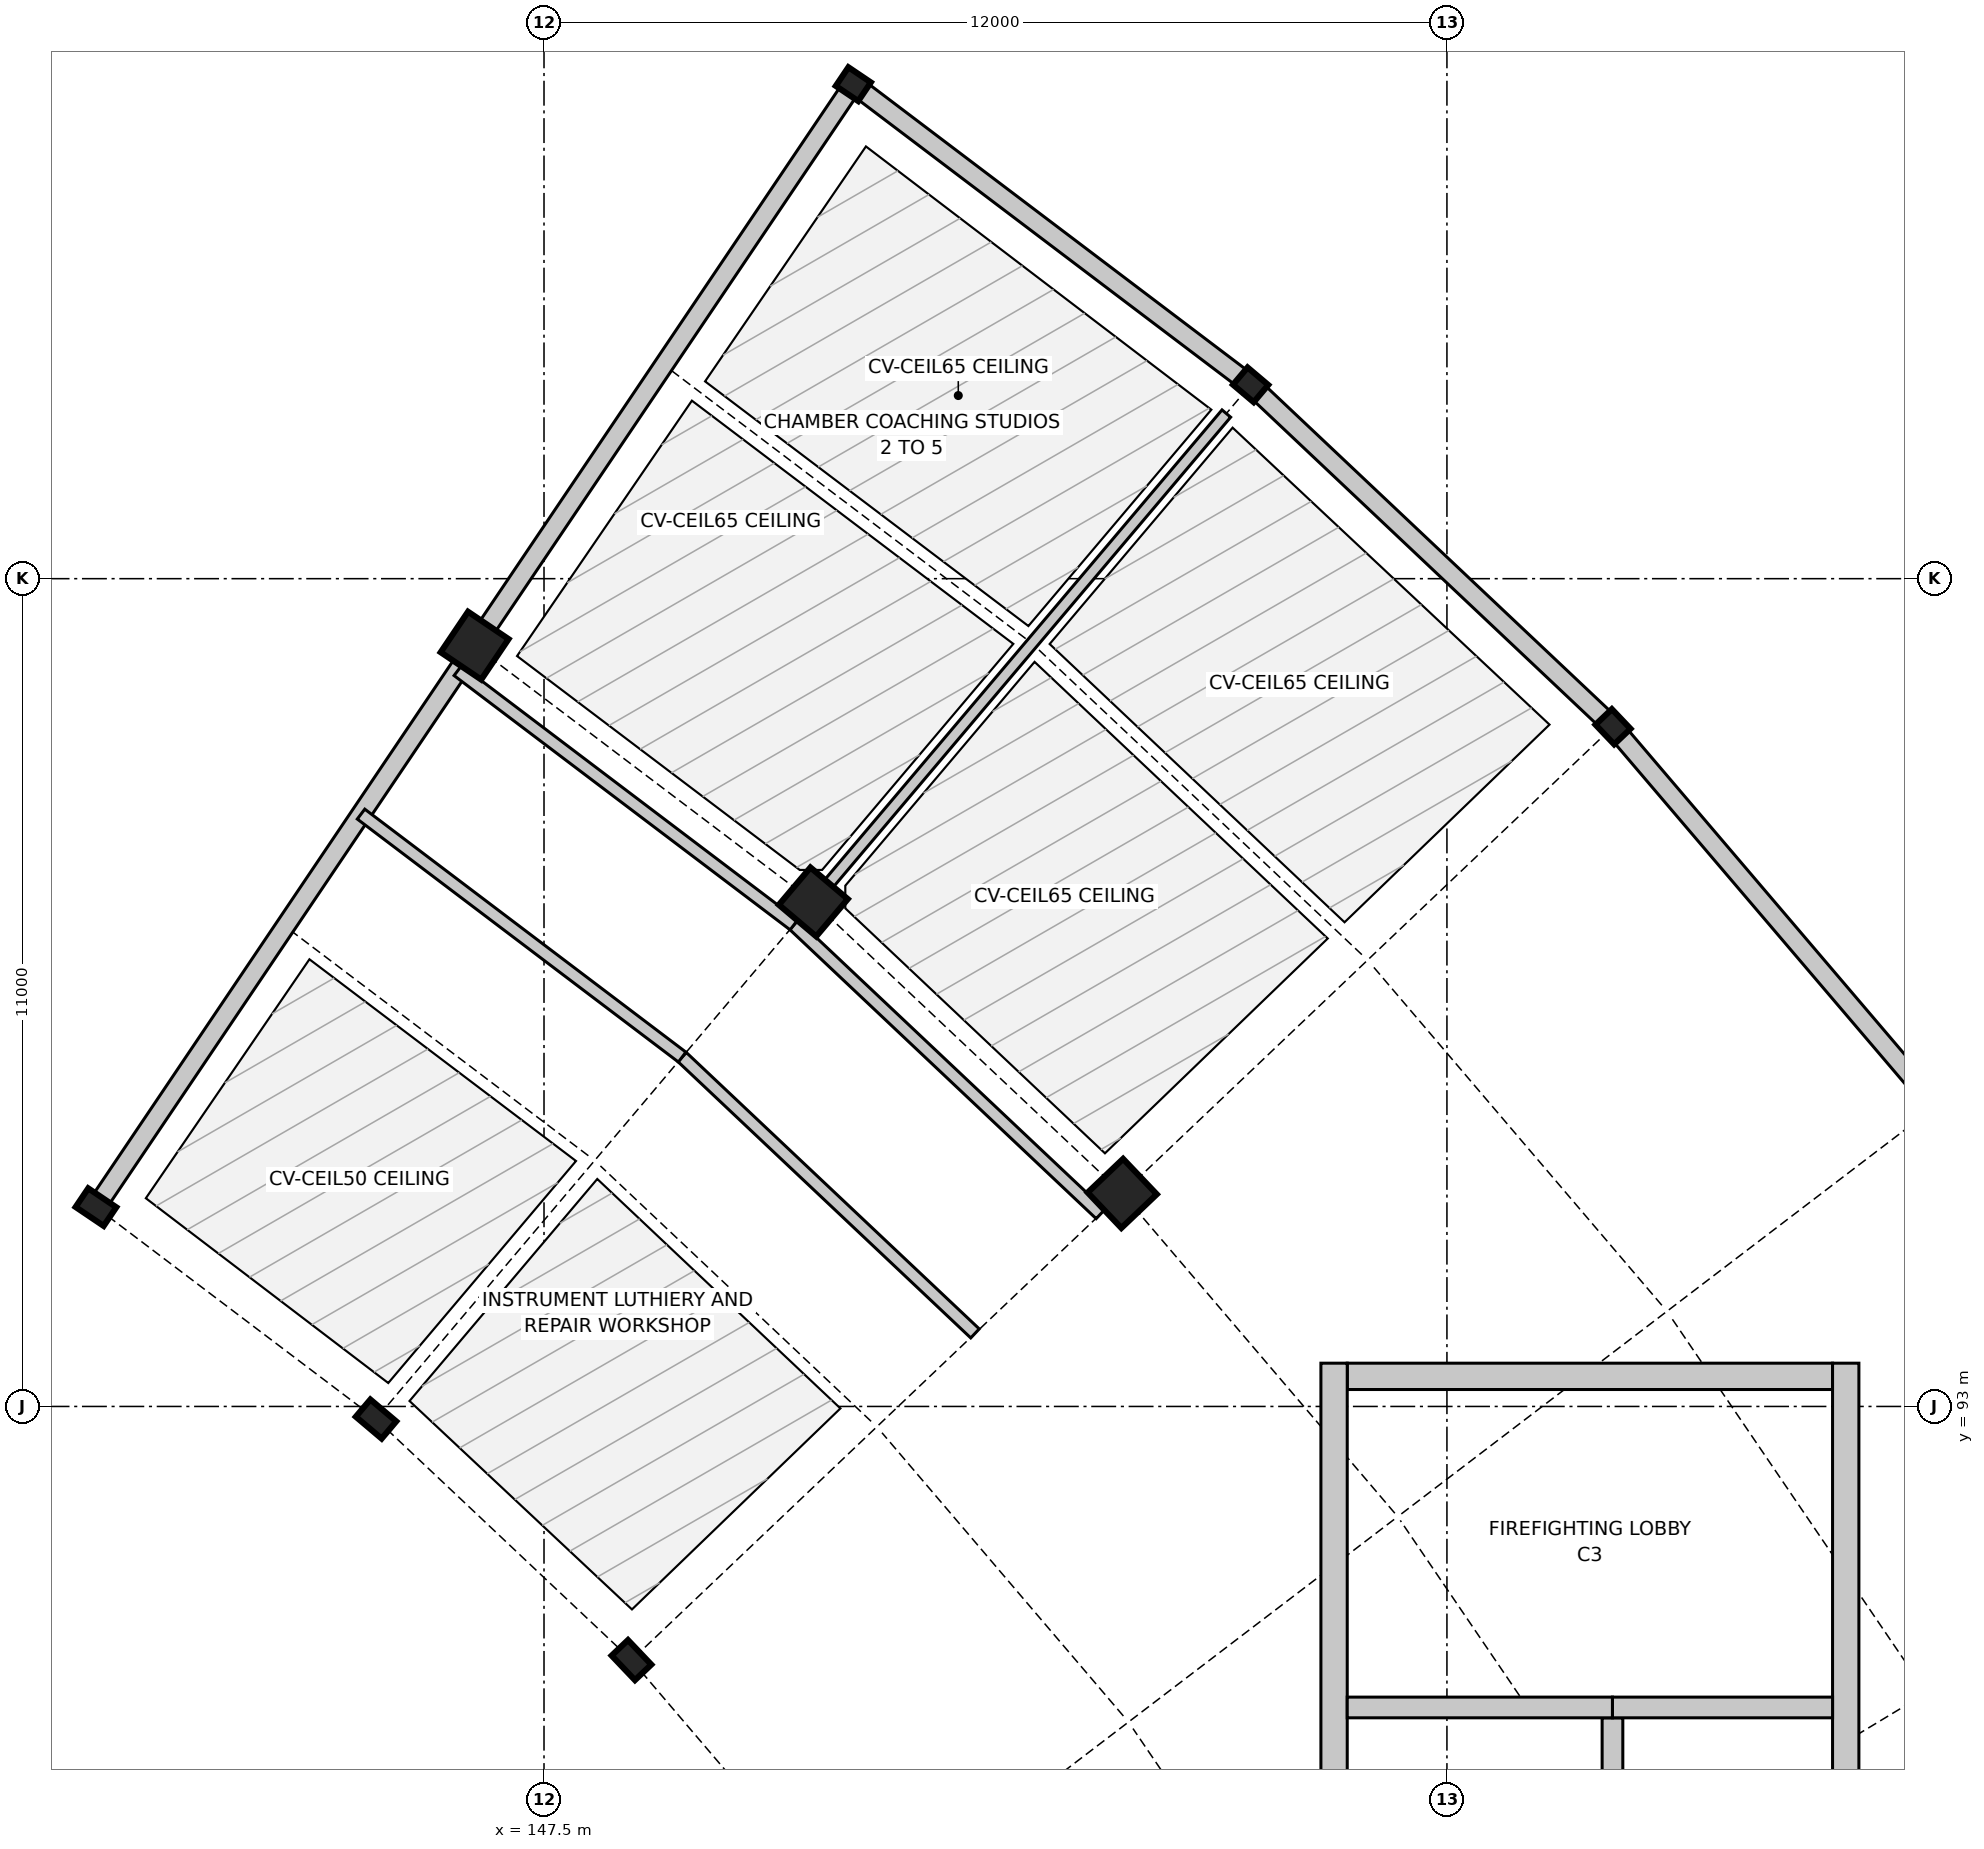
"""IFC4 building model, lengths in metres.
Left out: names, types, materials, properties, quantities, classifications, styles, units other than length and angle.
Written with IfcOpenShell. Run it as: python <this file> out.ifc"""

import sys

from ifc_helpers import new_model, si_unit, direction, frame, frame_2d, origin, origin_2d, place, context, subcontext, project, spatial, rectangle, i_section, extrude, element, fill, save


model = new_model("IFC4")
c1 = context("Model", 3, precision=1e-05, world=origin(), true_north=direction((0.0, 1.0)))
c2 = subcontext(c1, "Body", "Model", "MODEL_VIEW")
j1 = project(units=[si_unit("LENGTHUNIT", "METRE"), si_unit("PLANEANGLEUNIT", "RADIAN")], contexts=[c1])
p1 = place(None, origin())
s1 = spatial("IfcSite", under=j1, at=p1, CompositionType="ELEMENT")
p2 = place(p1, origin())
s2 = spatial("IfcBuilding", under=s1, at=p2, CompositionType="ELEMENT")
p3 = place(p2, frame((0.0, 0.0, 14.4)))
s3 = spatial("IfcBuildingStorey", under=s2, at=p3, CompositionType="ELEMENT", Elevation=14.4)
p4 = place(p3, frame((148.662, 89.629, 0.0), z_axis=(0.0, 0.0, 1.0), x_axis=(0.724653130187, 0.689113808387, 0.0)))
e1 = element("IfcColumn", 1, at=p4, inside=s3, PredefinedType="COLUMN", context=c2, shape_type="SweptSolid", body=[
    extrude(i_section(OverallWidth=0.3, OverallDepth=0.45, WebThickness=0.014, FlangeThickness=0.026, FilletRadius=0.027, at=origin_2d()), origin(), (0.0, 0.0, 1.0), 4.2),
])
p5 = place(p3, frame((155.185, 95.831, 0.0), z_axis=(0.0, 0.0, 1.0), x_axis=(0.724653130187, 0.689113808387, 0.0)))
e2 = element("IfcColumn", 2, at=p5, inside=s3, PredefinedType="COLUMN", context=c2, shape_type="SweptSolid", body=[
    extrude(rectangle(XDim=0.65, YDim=0.65, at=origin_2d()), origin(), (0.0, 0.0, 1.0), 4.2),
])
p6 = place(p3, frame((161.707, 102.032, 0.0), z_axis=(0.0, 0.0, 1.0), x_axis=(0.724653130187, 0.689113808387, 0.0)))
e3 = element("IfcColumn", 3, at=p6, inside=s3, PredefinedType="COLUMN", context=c2, shape_type="SweptSolid", body=[
    extrude(i_section(OverallWidth=0.3, OverallDepth=0.36, WebThickness=0.012, FlangeThickness=0.022, FilletRadius=0.027, at=origin_2d()), origin(), (0.0, 0.0, 1.0), 4.2),
])
p7 = place(p3, frame((145.267, 92.833, 0.0), z_axis=(0.0, 0.0, 1.0), x_axis=(0.645724263505, 0.763570674869, 0.0)))
e4 = element("IfcColumn", 4, at=p7, inside=s3, PredefinedType="COLUMN", context=c2, shape_type="SweptSolid", body=[
    extrude(i_section(OverallWidth=0.3, OverallDepth=0.45, WebThickness=0.014, FlangeThickness=0.026, FilletRadius=0.027, at=origin_2d()), origin(), (0.0, 0.0, 1.0), 4.2),
])
p8 = place(p3, frame((151.079, 99.704, 0.0), z_axis=(0.0, 0.0, 1.0), x_axis=(0.645724263505, 0.763570674869, 0.0)))
e5 = element("IfcColumn", 5, at=p8, inside=s3, PredefinedType="COLUMN", context=c2, shape_type="SweptSolid", body=[
    extrude(rectangle(XDim=0.65, YDim=0.65, at=origin_2d()), origin(), (0.0, 0.0, 1.0), 4.2),
])
p9 = place(p3, frame((156.891, 106.576, 0.0), z_axis=(0.0, 0.0, 1.0), x_axis=(0.645724263505, 0.763570674869, 0.0)))
e6 = element("IfcColumn", 6, at=p9, inside=s3, PredefinedType="COLUMN", context=c2, shape_type="SweptSolid", body=[
    extrude(i_section(OverallWidth=0.3, OverallDepth=0.36, WebThickness=0.012, FlangeThickness=0.022, FilletRadius=0.027, at=origin_2d()), origin(), (0.0, 0.0, 1.0), 4.2),
])
p10 = place(p3, frame((141.545, 95.649, 0.0), z_axis=(0.0, 0.0, 1.0), x_axis=(0.559192903471, 0.829037572555, 0.0)))
e7 = element("IfcColumn", 7, at=p10, inside=s3, PredefinedType="COLUMN", context=c2, shape_type="SweptSolid", body=[
    extrude(i_section(OverallWidth=0.3, OverallDepth=0.45, WebThickness=0.014, FlangeThickness=0.026, FilletRadius=0.027, at=origin_2d()), origin(), (0.0, 0.0, 1.0), 4.2),
])
p11 = place(p3, frame((146.578, 103.11, 0.0), z_axis=(0.0, 0.0, 1.0), x_axis=(0.559192903471, 0.829037572555, 0.0)))
e8 = element("IfcColumn", 8, at=p11, inside=s3, PredefinedType="COLUMN", context=c2, shape_type="SweptSolid", body=[
    extrude(rectangle(XDim=0.65, YDim=0.65, at=origin_2d()), origin(), (0.0, 0.0, 1.0), 4.2),
])
p12 = place(p3, frame((151.611, 110.571, 0.0), z_axis=(0.0, 0.0, 1.0), x_axis=(0.559192903471, 0.829037572555, 0.0)))
e9 = element("IfcColumn", 9, at=p12, inside=s3, PredefinedType="COLUMN", context=c2, shape_type="SweptSolid", body=[
    extrude(i_section(OverallWidth=0.3, OverallDepth=0.36, WebThickness=0.012, FlangeThickness=0.022, FilletRadius=0.027, at=origin_2d()), origin(), (0.0, 0.0, 1.0), 4.2),
])
p13 = place(p3, frame((161.72, 102.017, 0.0), z_axis=(0.0, 0.0, 1.0), x_axis=(0.648708464949, -0.761037007973, 0.0)))
e10 = element("IfcWall", 10, at=p13, inside=s3, PredefinedType="SOLIDWALL", context=c2, shape_type="SweptSolid", body=[
    extrude(rectangle(XDim=6.581, YDim=0.25, at=frame_2d((3.291, 0.0))), origin(), (0.0, 0.0, 1.0), 3.398),
])
p14 = place(p13, frame((2.615, 0.0, 0.9)))
e11 = element("IfcOpeningElement", 11, at=p14, cuts=e10, PredefinedType="OPENING", context=c2, shape_type="SweptSolid", body=[
    extrude(rectangle(XDim=1.35, YDim=1.55, at=frame_2d((0.675, 0.775))), frame((0.0, 0.135, 0.0), z_axis=(0.0, -1.0, 0.0), x_axis=(1.0, 0.0, 0.0)), (0.0, 0.0, 1.0), 0.27),
])
p15 = place(p3, frame((156.906, 106.562, 0.0), z_axis=(0.0, 0.0, 1.0), x_axis=(0.727377231984, -0.686237832235, 0.0)))
e12 = element("IfcWall", 12, at=p15, inside=s3, PredefinedType="SOLIDWALL", context=c2, shape_type="SweptSolid", body=[
    extrude(rectangle(XDim=6.581, YDim=0.25, at=frame_2d((3.291, 0.0))), origin(), (0.0, 0.0, 1.0), 3.398),
])
p16 = place(p15, frame((2.541, 0.0, 0.9)))
e13 = element("IfcOpeningElement", 13, at=p16, cuts=e12, PredefinedType="OPENING", context=c2, shape_type="SweptSolid", body=[
    extrude(rectangle(XDim=1.5, YDim=1.55, at=frame_2d((0.75, 0.775))), frame((0.0, 0.135, 0.0), z_axis=(0.0, -1.0, 0.0), x_axis=(1.0, 0.0, 0.0)), (0.0, 0.0, 1.0), 0.27),
])
p17 = place(p3, frame((151.627, 110.559, 0.0), z_axis=(0.0, 0.0, 1.0), x_axis=(0.797477783019, -0.603348311998, 0.0)))
e14 = element("IfcWall", 14, at=p17, inside=s3, PredefinedType="SOLIDWALL", context=c2, shape_type="SweptSolid", body=[
    extrude(rectangle(XDim=6.581, YDim=0.25, at=frame_2d((3.291, 0.0))), origin(), (0.0, 0.0, 1.0), 3.398),
])
p18 = place(p17, frame((2.466, 0.0, 0.9)))
e15 = element("IfcOpeningElement", 15, at=p18, cuts=e14, PredefinedType="OPENING", context=c2, shape_type="SweptSolid", body=[
    extrude(rectangle(XDim=1.65, YDim=1.55, at=frame_2d((0.825, 0.775))), frame((0.0, 0.135, 0.0), z_axis=(0.0, -1.0, 0.0), x_axis=(1.0, 0.0, 0.0)), (0.0, 0.0, 1.0), 0.27),
])
p19 = place(p3, frame((141.556, 95.665, 0.0), z_axis=(0.0, 0.0, 1.0), x_axis=(0.559200466777, 0.829032470991, 0.0)))
e16 = element("IfcWall", 16, at=p19, inside=s3, PredefinedType="SOLIDWALL", context=c2, shape_type="SweptSolid", body=[
    extrude(rectangle(XDim=8.96, YDim=0.25, at=frame_2d((4.48, 0.0))), origin(), (0.0, 0.0, 1.0), 3.398),
])
p20 = place(p3, frame((146.589, 103.127, 0.0), z_axis=(0.0, 0.0, 1.0), x_axis=(0.559213098812, 0.829023950268, 0.0)))
e17 = element("IfcWall", 17, at=p20, inside=s3, PredefinedType="SOLIDWALL", context=c2, shape_type="SweptSolid", body=[
    extrude(rectangle(XDim=8.96, YDim=0.25, at=frame_2d((4.48, 0.0))), origin(), (0.0, 0.0, 1.0), 3.398),
])
p21 = place(p3, frame((158.175, 93.4, 0.0), z_axis=(0.0, 0.0, 1.0), x_axis=(1.0, 0.0, 0.0)))
e18 = element("IfcWall", 18, at=p21, inside=s3, PredefinedType="SHEAR", context=c2, shape_type="SweptSolid", body=[
    extrude(rectangle(XDim=6.45, YDim=0.35, at=frame_2d((3.225, 0.0))), origin(), (0.0, 0.0, 1.0), 3.96),
])
p22 = place(p21, frame((2.55, 0.0, 0.0)))
e19 = element("IfcOpeningElement", 19, at=p22, cuts=e18, PredefinedType="OPENING", context=c2, shape_type="SweptSolid", body=[
    extrude(rectangle(XDim=1.35, YDim=2.2, at=frame_2d((0.675, 1.1))), frame((0.0, 0.185, 0.0), z_axis=(0.0, -1.0, 0.0), x_axis=(1.0, 0.0, 0.0)), (0.0, 0.0, 1.0), 0.37),
])
for number, where, z_axis, x_axis in (
    (20, (158.0, 81.975, 0.0), (0.0, 0.0, 1.0), (0.0, 1.0, 0.0)),
    (21, (164.8, 81.975, 0.0), (0.0, 0.0, 1.0), (0.0, 1.0, 0.0)),
):
    element("IfcWall", number, at=place(p3, frame(where, z_axis=z_axis, x_axis=x_axis)), inside=s3, PredefinedType="SHEAR", context=c2, shape_type="SweptSolid", body=[
        extrude(rectangle(XDim=11.6, YDim=0.35, at=frame_2d((5.8, 0.0))), origin(), (0.0, 0.0, 1.0), 3.96),
    ])
p23 = place(p3, frame((161.7, 81.975, 0.0), z_axis=(0.0, 0.0, 1.0), x_axis=(0.0, 1.0, 0.0)))
e22 = element("IfcWall", 22, at=p23, inside=s3, PredefinedType="SHEAR", context=c2, shape_type="SweptSolid", body=[
    extrude(rectangle(XDim=6.887, YDim=0.275, at=frame_2d((3.444, 0.0))), origin(), (0.0, 0.0, 1.0), 3.96),
])
p24 = place(p3, frame((158.175, 89.0, 0.0), z_axis=(0.0, 0.0, 1.0), x_axis=(1.0, 0.0, 0.0)))
e23 = element("IfcWall", 23, at=p24, inside=s3, PredefinedType="SHEAR", context=c2, shape_type="SweptSolid", body=[
    extrude(rectangle(XDim=3.525, YDim=0.275, at=frame_2d((1.762, 0.0))), origin(), (0.0, 0.0, 1.0), 3.96),
])
p25 = place(p24, frame((1.785, 0.0, 0.0)))
e24 = element("IfcOpeningElement", 24, at=p25, cuts=e23, PredefinedType="OPENING", context=c2, shape_type="SweptSolid", body=[
    extrude(rectangle(XDim=1.25, YDim=2.15, at=frame_2d((0.625, 1.075))), frame((0.0, 0.147, 0.0), z_axis=(0.0, -1.0, 0.0), x_axis=(1.0, 0.0, 0.0)), (0.0, 0.0, 1.0), 0.295),
])
p26 = place(p3, frame((161.7, 89.0, 0.0), z_axis=(0.0, 0.0, 1.0), x_axis=(1.0, 0.0, 0.0)))
e25 = element("IfcWall", 25, at=p26, inside=s3, PredefinedType="SHEAR", context=c2, shape_type="SweptSolid", body=[
    extrude(rectangle(XDim=2.925, YDim=0.275, at=frame_2d((1.462, 0.0))), origin(), (0.0, 0.0, 1.0), 3.96),
])
p27 = place(p26, frame((0.982, 0.0, 0.0)))
e26 = element("IfcOpeningElement", 26, at=p27, cuts=e25, PredefinedType="OPENING", context=c2, shape_type="SweptSolid", body=[
    extrude(rectangle(XDim=1.1, YDim=2.15, at=frame_2d((0.55, 1.075))), frame((0.0, 0.147, 0.0), z_axis=(0.0, -1.0, 0.0), x_axis=(1.0, 0.0, 0.0)), (0.0, 0.0, 1.0), 0.295),
])
p28 = place(p3, frame((153.228, 93.97, 0.0), z_axis=(0.0, 0.0, 1.0), x_axis=(-0.7273609966, 0.68625504051, 0.0)))
e27 = element("IfcWall", 27, at=p28, inside=s3, PredefinedType="PARTITIONING", context=c2, shape_type="SweptSolid", body=[
    extrude(rectangle(XDim=5.351, YDim=0.165, at=frame_2d((2.676, 0.0))), origin(), (0.0, 0.0, 1.0), 3.4),
])
p29 = place(p28, frame((2.151, 0.0, 0.0)))
e28 = element("IfcOpeningElement", 28, at=p29, cuts=e27, PredefinedType="OPENING", context=c2, shape_type="SweptSolid", body=[
    extrude(rectangle(XDim=1.05, YDim=2.15, at=frame_2d((0.525, 1.075))), frame((0.0, 0.093, 0.0), z_axis=(0.0, -1.0, 0.0), x_axis=(1.0, 0.0, 0.0)), (0.0, 0.0, 1.0), 0.185),
])
p30 = place(p3, frame((154.895, 95.555, 0.0), z_axis=(0.0, 0.0, 1.0), x_axis=(-0.727402273239, 0.686211288807, 0.0)))
e29 = element("IfcWall", 29, at=p30, inside=s3, PredefinedType="PARTITIONING", context=c2, shape_type="SweptSolid", body=[
    extrude(rectangle(XDim=5.601, YDim=0.165, at=frame_2d((2.801, 0.0))), origin(), (0.0, 0.0, 1.0), 3.4),
])
p31 = place(p30, frame((2.341, 0.0, 0.0)))
e30 = element("IfcOpeningElement", 30, at=p31, cuts=e29, PredefinedType="OPENING", context=c2, shape_type="SweptSolid", body=[
    extrude(rectangle(XDim=0.92, YDim=2.1, at=frame_2d((0.46, 1.05))), frame((0.0, 0.093, 0.0), z_axis=(0.0, -1.0, 0.0), x_axis=(1.0, 0.0, 0.0)), (0.0, 0.0, 1.0), 0.185),
])
p32 = place(p3, frame((149.336, 97.643, 0.0), z_axis=(0.0, 0.0, 1.0), x_axis=(-0.797474612376, 0.603352502784, 0.0)))
e31 = element("IfcWall", 31, at=p32, inside=s3, PredefinedType="PARTITIONING", context=c2, shape_type="SweptSolid", body=[
    extrude(rectangle(XDim=5.351, YDim=0.165, at=frame_2d((2.676, 0.0))), origin(), (0.0, 0.0, 1.0), 3.4),
])
p33 = place(p32, frame((2.151, 0.0, 0.0)))
e32 = element("IfcOpeningElement", 32, at=p33, cuts=e31, PredefinedType="OPENING", context=c2, shape_type="SweptSolid", body=[
    extrude(rectangle(XDim=1.05, YDim=2.15, at=frame_2d((0.525, 1.075))), frame((0.0, 0.093, 0.0), z_axis=(0.0, -1.0, 0.0), x_axis=(1.0, 0.0, 0.0)), (0.0, 0.0, 1.0), 0.185),
])
p34 = place(p3, frame((150.821, 99.399, 0.0), z_axis=(0.0, 0.0, 1.0), x_axis=(-0.797450601932, 0.603384237015, 0.0)))
e33 = element("IfcWall", 33, at=p34, inside=s3, PredefinedType="PARTITIONING", context=c2, shape_type="SweptSolid", body=[
    extrude(rectangle(XDim=5.601, YDim=0.165, at=frame_2d((2.8, 0.0))), origin(), (0.0, 0.0, 1.0), 3.4),
])
p35 = place(p34, frame((2.34, 0.0, 0.0)))
e34 = element("IfcOpeningElement", 34, at=p35, cuts=e33, PredefinedType="OPENING", context=c2, shape_type="SweptSolid", body=[
    extrude(rectangle(XDim=0.92, YDim=2.1, at=frame_2d((0.46, 1.05))), frame((0.0, 0.093, 0.0), z_axis=(0.0, -1.0, 0.0), x_axis=(1.0, 0.0, 0.0)), (0.0, 0.0, 1.0), 0.185),
])
p36 = place(p3, frame((150.95, 99.552, 0.0), z_axis=(0.0, 0.0, 1.0), x_axis=(0.645745976221, 0.763552312677, 0.0)))
e35 = element("IfcWall", 35, at=p36, inside=s3, PredefinedType="PARTITIONING", context=c2, shape_type="SweptSolid", body=[
    extrude(rectangle(XDim=8.7, YDim=0.15, at=frame_2d((4.35, 0.0))), origin(), (0.0, 0.0, 1.0), 3.4),
])
p37 = place(p14, origin())
e36 = element("IfcWindow", 36, at=p37, inside=s3, PartitioningType="SINGLE_PANEL", PredefinedType="WINDOW", context=c2, shape_type="SweptSolid", body=[
    extrude(rectangle(XDim=1.35, YDim=1.55, at=frame_2d((0.675, 0.775))), frame((0.0, 0.03, 0.0), z_axis=(0.0, -1.0, 0.0), x_axis=(1.0, 0.0, 0.0)), (0.0, 0.0, 1.0), 0.06),
])
fill(e11, e36)
p38 = place(p16, origin())
e37 = element("IfcWindow", 37, at=p38, inside=s3, PartitioningType="SINGLE_PANEL", PredefinedType="WINDOW", context=c2, shape_type="SweptSolid", body=[
    extrude(rectangle(XDim=1.5, YDim=1.55, at=frame_2d((0.75, 0.775))), frame((0.0, 0.03, 0.0), z_axis=(0.0, -1.0, 0.0), x_axis=(1.0, 0.0, 0.0)), (0.0, 0.0, 1.0), 0.06),
])
fill(e13, e37)
p39 = place(p18, origin())
e38 = element("IfcWindow", 38, at=p39, inside=s3, PartitioningType="SINGLE_PANEL", PredefinedType="WINDOW", context=c2, shape_type="SweptSolid", body=[
    extrude(rectangle(XDim=1.65, YDim=1.55, at=frame_2d((0.825, 0.775))), frame((0.0, 0.03, 0.0), z_axis=(0.0, -1.0, 0.0), x_axis=(1.0, 0.0, 0.0)), (0.0, 0.0, 1.0), 0.06),
])
fill(e15, e38)
p40 = place(p25, origin())
e39 = element("IfcDoor", 39, at=p40, inside=s3, OperationType="SINGLE_SWING_RIGHT", PredefinedType="DOOR", context=c2, shape_type="SweptSolid", body=[
    extrude(rectangle(XDim=1.25, YDim=2.15, at=frame_2d((0.625, 1.075))), frame((0.0, 0.025, 0.0), z_axis=(0.0, -1.0, 0.0), x_axis=(1.0, 0.0, 0.0)), (0.0, 0.0, 1.0), 0.05),
])
fill(e24, e39)
p41 = place(p27, origin())
e40 = element("IfcDoor", 40, at=p41, inside=s3, OperationType="DOUBLE_DOOR_SLIDING", PredefinedType="DOOR", context=c2, shape_type="SweptSolid", body=[
    extrude(rectangle(XDim=1.1, YDim=2.15, at=frame_2d((0.55, 1.075))), frame((0.0, 0.025, 0.0), z_axis=(0.0, -1.0, 0.0), x_axis=(1.0, 0.0, 0.0)), (0.0, 0.0, 1.0), 0.05),
])
fill(e26, e40)
p42 = place(p22, origin())
e41 = element("IfcDoor", 41, at=p42, inside=s3, OperationType="SINGLE_SWING_LEFT", PredefinedType="DOOR", context=c2, shape_type="SweptSolid", body=[
    extrude(rectangle(XDim=1.35, YDim=2.2, at=frame_2d((0.675, 1.1))), frame((0.0, 0.025, 0.0), z_axis=(0.0, -1.0, 0.0), x_axis=(1.0, 0.0, 0.0)), (0.0, 0.0, 1.0), 0.05),
])
fill(e19, e41)
p43 = place(p29, origin())
e42 = element("IfcDoor", 42, at=p43, inside=s3, OperationType="SINGLE_SWING_LEFT", PredefinedType="DOOR", context=c2, shape_type="SweptSolid", body=[
    extrude(rectangle(XDim=1.05, YDim=2.15, at=frame_2d((0.525, 1.075))), frame((0.0, 0.025, 0.0), z_axis=(0.0, -1.0, 0.0), x_axis=(1.0, 0.0, 0.0)), (0.0, 0.0, 1.0), 0.05),
])
fill(e28, e42)
p44 = place(p31, origin())
e43 = element("IfcDoor", 43, at=p44, inside=s3, OperationType="SINGLE_SWING_RIGHT", PredefinedType="DOOR", context=c2, shape_type="SweptSolid", body=[
    extrude(rectangle(XDim=0.92, YDim=2.1, at=frame_2d((0.46, 1.05))), frame((0.0, 0.025, 0.0), z_axis=(0.0, -1.0, 0.0), x_axis=(1.0, 0.0, 0.0)), (0.0, 0.0, 1.0), 0.05),
])
fill(e30, e43)
p45 = place(p33, origin())
e44 = element("IfcDoor", 44, at=p45, inside=s3, OperationType="SINGLE_SWING_LEFT", PredefinedType="DOOR", context=c2, shape_type="SweptSolid", body=[
    extrude(rectangle(XDim=1.05, YDim=2.15, at=frame_2d((0.525, 1.075))), frame((0.0, 0.025, 0.0), z_axis=(0.0, -1.0, 0.0), x_axis=(1.0, 0.0, 0.0)), (0.0, 0.0, 1.0), 0.05),
])
fill(e32, e44)
p46 = place(p35, origin())
e45 = element("IfcDoor", 45, at=p46, inside=s3, OperationType="SINGLE_SWING_RIGHT", PredefinedType="DOOR", context=c2, shape_type="SweptSolid", body=[
    extrude(rectangle(XDim=0.92, YDim=2.1, at=frame_2d((0.46, 1.05))), frame((0.0, 0.025, 0.0), z_axis=(0.0, -1.0, 0.0), x_axis=(1.0, 0.0, 0.0)), (0.0, 0.0, 1.0), 0.05),
])
fill(e34, e45)
save(model, sys.argv[1])
